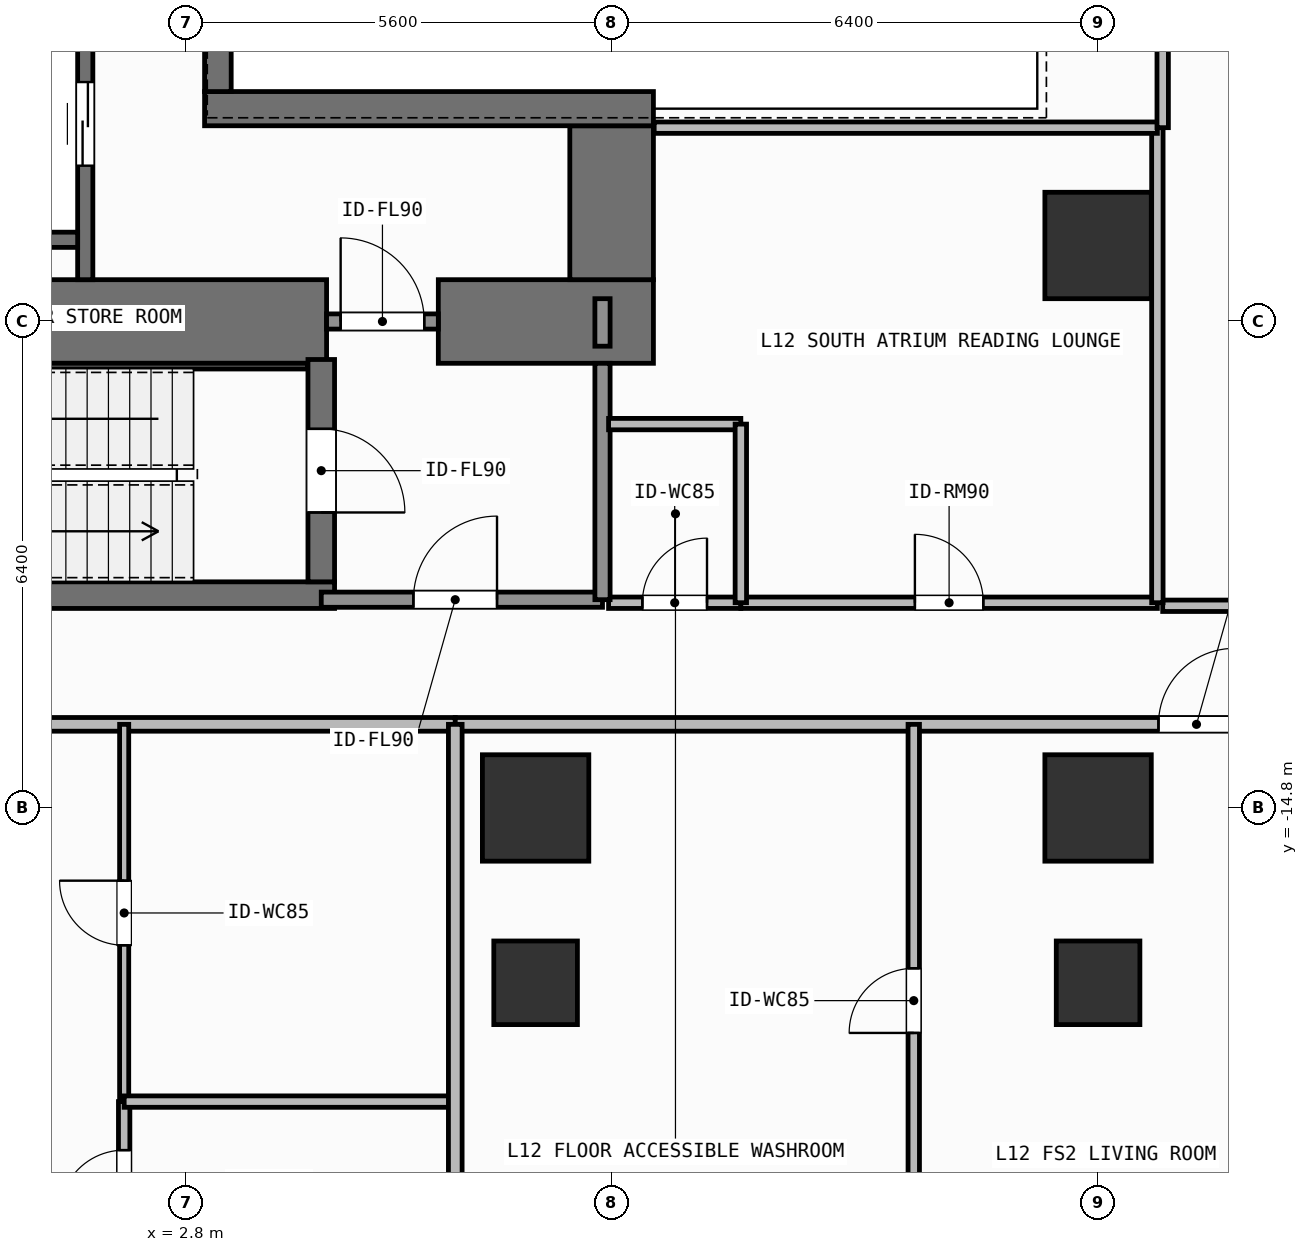
"""IFC4 building model, lengths in metres.
Left out: names, types, materials, properties, quantities, classifications, styles, units other than length and angle.
Written with IfcOpenShell. Run it as: python <this file> out.ifc"""

import sys

from ifc_helpers import new_model, si_unit, direction, frame, frame_2d, origin, origin_2d, place, context, subcontext, project, spatial, rectangle, extrude, element, fill, save


model = new_model("IFC4")
c1 = context("Model", 3, precision=1e-05, world=origin(), true_north=direction((0.0, 1.0)))
c2 = subcontext(c1, "Body", "Model", "MODEL_VIEW")
j1 = project(units=[si_unit("LENGTHUNIT", "METRE"), si_unit("PLANEANGLEUNIT", "RADIAN")], contexts=[c1])
p1 = place(None, origin())
s1 = spatial("IfcSite", under=j1, at=p1, CompositionType="ELEMENT")
p2 = place(p1, origin())
s2 = spatial("IfcBuilding", under=s1, at=p2, CompositionType="ELEMENT")
p3 = place(p2, frame((0.0, 0.0, 46.2)))
s3 = spatial("IfcBuildingStorey", under=s2, at=p3, CompositionType="ELEMENT", Elevation=46.2)
p4 = place(p3, frame((-2.62, -8.4, 0.0), z_axis=(0.0, 0.0, 1.0), x_axis=(1.0, 0.0, 0.0)))
e1 = element("IfcWall", 1, at=p4, inside=s3, PredefinedType="SHEAR", context=c2, shape_type="SweptSolid", body=[
    extrude(rectangle(XDim=7.27, YDim=1.1, at=frame_2d((3.635, 0.0))), origin(), (0.0, 0.0, 1.0), 3.9),
])
p5 = place(p3, frame((6.12, -8.4, 0.0), z_axis=(0.0, 0.0, 1.0), x_axis=(1.0, 0.0, 0.0)))
e2 = element("IfcWall", 2, at=p5, inside=s3, PredefinedType="SHEAR", context=c2, shape_type="SweptSolid", body=[
    extrude(rectangle(XDim=2.83, YDim=1.1, at=frame_2d((1.415, 0.0))), origin(), (0.0, 0.0, 1.0), 3.9),
])
p6 = place(p3, frame((8.4, -7.85, 0.0), z_axis=(0.0, 0.0, 1.0), x_axis=(0.0, 1.0, 0.0)))
e3 = element("IfcWall", 3, at=p6, inside=s3, PredefinedType="SHEAR", context=c2, shape_type="SweptSolid", body=[
    extrude(rectangle(XDim=2.025, YDim=1.1, at=frame_2d((1.013, 0.0))), origin(), (0.0, 0.0, 1.0), 3.9),
])
p7 = place(p3, frame((3.045, -5.6, 0.0), z_axis=(0.0, 0.0, 1.0), x_axis=(1.0, 0.0, 0.0)))
e4 = element("IfcWall", 4, at=p7, inside=s3, PredefinedType="SHEAR", context=c2, shape_type="SweptSolid", body=[
    extrude(rectangle(XDim=5.905, YDim=0.45, at=frame_2d((2.953, 0.0))), origin(), (0.0, 0.0, 1.0), 3.9),
])
p8 = place(p3, frame((3.22, -5.375, 0.0), z_axis=(0.0, 0.0, 1.0), x_axis=(0.0, 1.0, 0.0)))
e5 = element("IfcWall", 5, at=p8, inside=s3, PredefinedType="SHEAR", context=c2, shape_type="SweptSolid", body=[
    extrude(rectangle(XDim=10.75, YDim=0.35, at=frame_2d((5.375, 0.0))), origin(), (0.0, 0.0, 1.0), 3.9),
])
p9 = place(p3, frame((-2.555, -12.0, 0.0), z_axis=(0.0, 0.0, 1.0), x_axis=(1.0, 0.0, 0.0)))
e6 = element("IfcWall", 6, at=p9, inside=s3, PredefinedType="SHEAR", context=c2, shape_type="SweptSolid", body=[
    extrude(rectangle(XDim=7.31, YDim=0.35, at=frame_2d((3.655, 0.0))), origin(), (0.0, 0.0, 1.0), 3.9),
])
p10 = place(p3, frame((-2.2, -8.988, 0.0), z_axis=(0.0, 0.0, 1.0), x_axis=(1.0, 0.0, 0.0)))
e7 = element("IfcWall", 7, at=p10, inside=s3, PredefinedType="SHEAR", context=c2, shape_type="SweptSolid", body=[
    extrude(rectangle(XDim=6.6, YDim=0.075, at=frame_2d((3.3, 0.0))), origin(), (0.0, 0.0, 1.0), 3.9),
])
p11 = place(p3, frame((4.58, -8.9, 0.0), z_axis=(0.0, 0.0, 1.0), x_axis=(0.0, -1.0, 0.0)))
e8 = element("IfcWall", 8, at=p11, inside=s3, PredefinedType="SHEAR", context=c2, shape_type="SweptSolid", body=[
    extrude(rectangle(XDim=2.925, YDim=0.35, at=frame_2d((1.462, 0.0))), origin(), (0.0, 0.0, 1.0), 3.9),
])
p12 = place(p11, frame((0.913, 0.0, 0.0)))
e9 = element("IfcOpeningElement", 9, at=p12, cuts=e8, PredefinedType="OPENING", context=c2, shape_type="SweptSolid", body=[
    extrude(rectangle(XDim=1.1, YDim=2.15, at=frame_2d((0.55, 1.075))), frame((0.0, 0.185, 0.0), z_axis=(0.0, -1.0, 0.0), x_axis=(1.0, 0.0, 0.0)), (0.0, 0.0, 1.0), 0.37),
])
for number, where, z_axis, x_axis in (
    (10, (7.4, -14.8, 0.0), (0.0, 0.0, 1.0), (1.0, 0.0, 0.0)),
    (11, (14.8, -14.8, 0.0), (0.0, 0.0, 1.0), (1.0, 0.0, 0.0)),
    (12, (14.8, -7.4, 0.0), (0.0, 0.0, 1.0), (1.0, 0.0, 0.0)),
):
    element("IfcColumn", number, at=place(p3, frame(where, z_axis=z_axis, x_axis=x_axis)), inside=s3, PredefinedType="COLUMN", context=c2, shape_type="SweptSolid", body=[
        extrude(rectangle(XDim=1.4, YDim=1.4, at=origin_2d()), origin(), (0.0, 0.0, 1.0), 3.9),
    ])
for number, where, z_axis, x_axis in (
    (13, (7.4, -17.1, 0.0), (0.0, 0.0, 1.0), (1.0, 0.0, 0.0)),
    (14, (14.8, -17.1, 0.0), (0.0, 0.0, 1.0), (1.0, 0.0, 0.0)),
):
    element("IfcColumn", number, at=place(p3, frame(where, z_axis=z_axis, x_axis=x_axis)), inside=s3, PredefinedType="COLUMN", context=c2, shape_type="SweptSolid", body=[
        extrude(rectangle(XDim=1.1, YDim=1.1, at=origin_2d()), origin(), (0.0, 0.0, 1.0), 3.9),
    ])
p13 = place(p3, frame((1.475, -7.85, 0.0), z_axis=(0.0, 0.0, 1.0), x_axis=(0.0, 1.0, 0.0)))
e15 = element("IfcWall", 15, at=p13, inside=s3, PredefinedType="SHEAR", context=c2, shape_type="SweptSolid", body=[
    extrude(rectangle(XDim=3.575, YDim=0.2, at=frame_2d((1.788, 0.0))), origin(), (0.0, 0.0, 1.0), 3.68),
])
p14 = place(p13, frame((1.5, 0.0, 0.0)))
e16 = element("IfcOpeningElement", 16, at=p14, cuts=e15, PredefinedType="OPENING", context=c2, shape_type="SweptSolid", body=[
    extrude(rectangle(XDim=1.1, YDim=2.2, at=frame_2d((0.55, 1.1))), frame((0.0, 0.11, 0.0), z_axis=(0.0, -1.0, 0.0), x_axis=(1.0, 0.0, 0.0)), (0.0, 0.0, 1.0), 0.22),
])
p15 = place(p3, frame((-0.975, -7.325, 0.0), z_axis=(0.0, 0.0, 1.0), x_axis=(1.0, 0.0, 0.0)))
e17 = element("IfcWall", 17, at=p15, inside=s3, PredefinedType="SHEAR", context=c2, shape_type="SweptSolid", body=[
    extrude(rectangle(XDim=2.35, YDim=0.2, at=frame_2d((1.175, 0.0))), origin(), (0.0, 0.0, 1.0), 3.68),
])
p16 = place(p3, frame((4.58, -12.06, 0.0), z_axis=(0.0, 0.0, 1.0), x_axis=(1.0, 0.0, 0.0)))
e18 = element("IfcWall", 18, at=p16, inside=s3, PredefinedType="SOLIDWALL", context=c2, shape_type="SweptSolid", body=[
    extrude(rectangle(XDim=3.7, YDim=0.2, at=frame_2d((1.85, 0.0))), origin(), (0.0, 0.0, 1.0), 3.68),
])
p17 = place(p16, frame((1.212, 0.0, 0.0)))
e19 = element("IfcOpeningElement", 19, at=p17, cuts=e18, PredefinedType="OPENING", context=c2, shape_type="SweptSolid", body=[
    extrude(rectangle(XDim=1.1, YDim=2.15, at=frame_2d((0.55, 1.075))), frame((0.0, 0.11, 0.0), z_axis=(0.0, -1.0, 0.0), x_axis=(1.0, 0.0, 0.0)), (0.0, 0.0, 1.0), 0.22),
])
p18 = place(p3, frame((4.65, -8.4, 0.0), z_axis=(0.0, 0.0, 1.0), x_axis=(1.0, 0.0, 0.0)))
e20 = element("IfcWall", 20, at=p18, inside=s3, PredefinedType="SOLIDWALL", context=c2, shape_type="SweptSolid", body=[
    extrude(rectangle(XDim=1.47, YDim=0.2, at=frame_2d((0.735, 0.0))), origin(), (0.0, 0.0, 1.0), 2.72),
])
p19 = place(p18, frame((0.185, 0.0, 0.0)))
e21 = element("IfcOpeningElement", 21, at=p19, cuts=e20, PredefinedType="OPENING", context=c2, shape_type="SweptSolid", body=[
    extrude(rectangle(XDim=1.1, YDim=2.15, at=frame_2d((0.55, 1.075))), frame((0.0, 0.11, 0.0), z_axis=(0.0, -1.0, 0.0), x_axis=(1.0, 0.0, 0.0)), (0.0, 0.0, 1.0), 0.22),
])
p20 = place(p3, frame((8.36, -12.1, 0.0), z_axis=(0.0, 0.0, 1.0), x_axis=(1.0, 0.0, 0.0)))
e22 = element("IfcWall", 22, at=p20, inside=s3, PredefinedType="PARTITIONING", context=c2, shape_type="SweptSolid", body=[
    extrude(rectangle(XDim=1.74, YDim=0.15, at=frame_2d((0.87, 0.0))), origin(), (0.0, 0.0, 1.0), 3.68),
])
p21 = place(p20, frame((0.445, 0.0, 0.0)))
e23 = element("IfcOpeningElement", 23, at=p21, cuts=e22, PredefinedType="OPENING", context=c2, shape_type="SweptSolid", body=[
    extrude(rectangle(XDim=0.85, YDim=2.1, at=frame_2d((0.425, 1.05))), frame((0.0, 0.085, 0.0), z_axis=(0.0, -1.0, 0.0), x_axis=(1.0, 0.0, 0.0)), (0.0, 0.0, 1.0), 0.17),
])
p22 = place(p3, frame((10.1, -12.1, 0.0), z_axis=(0.0, 0.0, 1.0), x_axis=(1.0, 0.0, 0.0)))
e24 = element("IfcWall", 24, at=p22, inside=s3, PredefinedType="PARTITIONING", context=c2, shape_type="SweptSolid", body=[
    extrude(rectangle(XDim=5.48, YDim=0.15, at=frame_2d((2.74, 0.0))), origin(), (0.0, 0.0, 1.0), 3.68),
])
p23 = place(p22, frame((2.29, 0.0, 0.0)))
e25 = element("IfcOpeningElement", 25, at=p23, cuts=e24, PredefinedType="OPENING", context=c2, shape_type="SweptSolid", body=[
    extrude(rectangle(XDim=0.9, YDim=2.1, at=frame_2d((0.45, 1.05))), frame((0.0, 0.085, 0.0), z_axis=(0.0, -1.0, 0.0), x_axis=(1.0, 0.0, 0.0)), (0.0, 0.0, 1.0), 0.17),
])
p24 = place(p3, frame((-18.62, -13.7, 0.0), z_axis=(0.0, 0.0, 1.0), x_axis=(1.0, 0.0, 0.0)))
e26 = element("IfcWall", 26, at=p24, inside=s3, PredefinedType="PARTITIONING", context=c2, shape_type="SweptSolid", body=[
    extrude(rectangle(XDim=24.963, YDim=0.18, at=frame_2d((12.481, 0.0))), origin(), (0.0, 0.0, 1.0), 3.68),
])
p25 = place(p24, frame((11.981, 0.0, 0.0)))
e27 = element("IfcOpeningElement", 27, at=p25, cuts=e26, PredefinedType="OPENING", context=c2, shape_type="SweptSolid", body=[
    extrude(rectangle(XDim=1.0, YDim=2.2, at=frame_2d((0.5, 1.1))), frame((0.0, 0.1, 0.0), z_axis=(0.0, -1.0, 0.0), x_axis=(1.0, 0.0, 0.0)), (0.0, 0.0, 1.0), 0.2),
])
p26 = place(p3, frame((1.987, -20.79, 0.0), z_axis=(0.0, 0.0, 1.0), x_axis=(0.0, 1.0, 0.0)))
e28 = element("IfcWall", 28, at=p26, inside=s3, PredefinedType="PARTITIONING", context=c2, shape_type="SweptSolid", body=[
    extrude(rectangle(XDim=2.127, YDim=0.15, at=frame_2d((1.063, 0.0))), origin(), (0.0, 0.0, 1.0), 3.68),
])
p27 = place(p26, frame((0.638, 0.0, 0.0)))
e29 = element("IfcOpeningElement", 29, at=p27, cuts=e28, PredefinedType="OPENING", context=c2, shape_type="SweptSolid", body=[
    extrude(rectangle(XDim=0.85, YDim=2.1, at=frame_2d((0.425, 1.05))), frame((0.0, 0.085, 0.0), z_axis=(0.0, -1.0, 0.0), x_axis=(1.0, 0.0, 0.0)), (0.0, 0.0, 1.0), 0.17),
])
p28 = place(p3, frame((1.987, -18.663, 0.0), z_axis=(0.0, 0.0, 1.0), x_axis=(0.0, 1.0, 0.0)))
e30 = element("IfcWall", 30, at=p28, inside=s3, PredefinedType="PARTITIONING", context=c2, shape_type="SweptSolid", body=[
    extrude(rectangle(XDim=4.963, YDim=0.12, at=frame_2d((2.481, 0.0))), origin(), (0.0, 0.0, 1.0), 3.68),
])
p29 = place(p28, frame((2.056, 0.0, 0.0)))
e31 = element("IfcOpeningElement", 31, at=p29, cuts=e30, PredefinedType="OPENING", context=c2, shape_type="SweptSolid", body=[
    extrude(rectangle(XDim=0.85, YDim=2.1, at=frame_2d((0.425, 1.05))), frame((0.0, 0.07, 0.0), z_axis=(0.0, -1.0, 0.0), x_axis=(1.0, 0.0, 0.0)), (0.0, 0.0, 1.0), 0.14),
])
p30 = place(p3, frame((6.343, -13.7, 0.0), z_axis=(0.0, 0.0, 1.0), x_axis=(1.0, 0.0, 0.0)))
e32 = element("IfcWall", 32, at=p30, inside=s3, PredefinedType="PARTITIONING", context=c2, shape_type="SweptSolid", body=[
    extrude(rectangle(XDim=18.077, YDim=0.18, at=frame_2d((9.039, 0.0))), origin(), (0.0, 0.0, 1.0), 3.68),
])
p31 = place(p30, frame((9.252, 0.0, 0.0)))
e33 = element("IfcOpeningElement", 33, at=p31, cuts=e32, PredefinedType="OPENING", context=c2, shape_type="SweptSolid", body=[
    extrude(rectangle(XDim=1.0, YDim=2.2, at=frame_2d((0.5, 1.1))), frame((0.0, 0.1, 0.0), z_axis=(0.0, -1.0, 0.0), x_axis=(1.0, 0.0, 0.0)), (0.0, 0.0, 1.0), 0.2),
])
p32 = place(p3, frame((12.375, -20.79, 0.0), z_axis=(0.0, 0.0, 1.0), x_axis=(0.0, 1.0, 0.0)))
e34 = element("IfcWall", 34, at=p32, inside=s3, PredefinedType="PARTITIONING", context=c2, shape_type="SweptSolid", body=[
    extrude(rectangle(XDim=7.09, YDim=0.15, at=frame_2d((3.545, 0.0))), origin(), (0.0, 0.0, 1.0), 3.68),
])
p33 = place(p32, frame((3.03, 0.0, 0.0)))
e35 = element("IfcOpeningElement", 35, at=p33, cuts=e34, PredefinedType="OPENING", context=c2, shape_type="SweptSolid", body=[
    extrude(rectangle(XDim=0.85, YDim=2.1, at=frame_2d((0.425, 1.05))), frame((0.0, 0.085, 0.0), z_axis=(0.0, -1.0, 0.0), x_axis=(1.0, 0.0, 0.0)), (0.0, 0.0, 1.0), 0.17),
])
p34 = place(p3, frame((15.65, -12.14, 0.0), z_axis=(0.0, 0.0, 1.0), x_axis=(1.0, 0.0, 0.0)))
e36 = element("IfcWall", 36, at=p34, inside=s3, PredefinedType="PARTITIONING", context=c2, shape_type="SweptSolid", body=[
    extrude(rectangle(XDim=12.27, YDim=0.15, at=frame_2d((6.135, 0.0))), origin(), (0.0, 0.0, 1.0), 3.68),
])
p35 = place(p34, frame((5.15, 0.0, 0.0)))
e37 = element("IfcOpeningElement", 37, at=p35, cuts=e36, PredefinedType="OPENING", context=c2, shape_type="SweptSolid", body=[
    extrude(rectangle(XDim=0.9, YDim=2.1, at=frame_2d((0.45, 1.05))), frame((0.0, 0.085, 0.0), z_axis=(0.0, -1.0, 0.0), x_axis=(1.0, 0.0, 0.0)), (0.0, 0.0, 1.0), 0.17),
])
p36 = place(p3, frame((8.28, -12.06, 0.0), z_axis=(0.0, 0.0, 1.0), x_axis=(0.0, 1.0, 0.0)))
e38 = element("IfcWall", 38, at=p36, inside=s3, PredefinedType="SOLIDWALL", context=c2, shape_type="SweptSolid", body=[
    extrude(rectangle(XDim=3.11, YDim=0.2, at=frame_2d((1.555, 0.0))), origin(), (0.0, 0.0, 1.0), 3.68),
])
p37 = place(p3, frame((8.28, -8.725, 0.0), z_axis=(0.0, 0.0, 1.0), x_axis=(0.0, 1.0, 0.0)))
e39 = element("IfcWall", 39, at=p37, inside=s3, PredefinedType="SOLIDWALL", context=c2, shape_type="SweptSolid", body=[
    extrude(rectangle(XDim=0.625, YDim=0.2, at=frame_2d((0.312, 0.0))), origin(), (0.0, 0.0, 1.0), 3.68),
])
p38 = place(p3, frame((8.36, -9.75, 0.0), z_axis=(0.0, 0.0, 1.0), x_axis=(1.0, 0.0, 0.0)))
e40 = element("IfcWall", 40, at=p38, inside=s3, PredefinedType="PARTITIONING", context=c2, shape_type="SweptSolid", body=[
    extrude(rectangle(XDim=1.74, YDim=0.15, at=frame_2d((0.87, 0.0))), origin(), (0.0, 0.0, 1.0), 3.68),
])
p39 = place(p3, frame((10.1, -12.1, 0.0), z_axis=(0.0, 0.0, 1.0), x_axis=(0.0, 1.0, 0.0)))
e41 = element("IfcWall", 41, at=p39, inside=s3, PredefinedType="PARTITIONING", context=c2, shape_type="SweptSolid", body=[
    extrude(rectangle(XDim=2.35, YDim=0.15, at=frame_2d((1.175, 0.0))), origin(), (0.0, 0.0, 1.0), 3.68),
])
p40 = place(p3, frame((15.58, -12.1, 0.0), z_axis=(0.0, 0.0, 1.0), x_axis=(0.0, 1.0, 0.0)))
e42 = element("IfcWall", 42, at=p40, inside=s3, PredefinedType="PARTITIONING", context=c2, shape_type="SweptSolid", body=[
    extrude(rectangle(XDim=6.25, YDim=0.15, at=frame_2d((3.125, 0.0))), origin(), (0.0, 0.0, 1.0), 3.68),
])
p41 = place(p3, frame((8.96, -5.85, 0.0), z_axis=(0.0, 0.0, 1.0), x_axis=(1.0, 0.0, 0.0)))
e43 = element("IfcWall", 43, at=p41, inside=s3, PredefinedType="PARTITIONING", context=c2, shape_type="SweptSolid", body=[
    extrude(rectangle(XDim=6.62, YDim=0.15, at=frame_2d((3.31, 0.0))), origin(), (0.0, 0.0, 1.0), 3.68),
])
p42 = place(p3, frame((1.987, -18.663, 0.0), z_axis=(0.0, 0.0, 1.0), x_axis=(1.0, 0.0, 0.0)))
e44 = element("IfcWall", 44, at=p42, inside=s3, PredefinedType="PARTITIONING", context=c2, shape_type="SweptSolid", body=[
    extrude(rectangle(XDim=4.356, YDim=0.15, at=frame_2d((2.178, 0.0))), origin(), (0.0, 0.0, 1.0), 3.68),
])
p43 = place(p3, frame((6.343, -25.03, 0.0), z_axis=(0.0, 0.0, 1.0), x_axis=(0.0, 1.0, 0.0)))
e45 = element("IfcWall", 45, at=p43, inside=s3, PredefinedType="PARTITIONING", context=c2, shape_type="SweptSolid", body=[
    extrude(rectangle(XDim=11.33, YDim=0.18, at=frame_2d((5.665, 0.0))), origin(), (0.0, 0.0, 1.0), 3.68),
])
p44 = place(p3, frame((15.65, -5.85, 0.0), z_axis=(0.0, 0.0, 1.0), x_axis=(0.0, 1.0, 0.0)))
e46 = element("IfcWall", 46, at=p44, inside=s3, PredefinedType="PARTITIONING", context=c2, shape_type="SweptSolid", body=[
    extrude(rectangle(XDim=3.1, YDim=0.15, at=frame_2d((1.55, 0.0))), origin(), (0.0, 0.0, 1.0), 3.68),
])
p45 = place(p14, origin())
e47 = element("IfcDoor", 47, at=p45, inside=s3, OperationType="SLIDING_TO_LEFT", PredefinedType="DOOR", context=c2, shape_type="SweptSolid", body=[
    extrude(rectangle(XDim=1.1, YDim=2.2, at=frame_2d((0.55, 1.1))), frame((0.0, 0.025, 0.0), z_axis=(0.0, -1.0, 0.0), x_axis=(1.0, 0.0, 0.0)), (0.0, 0.0, 1.0), 0.05),
])
fill(e16, e47)
p46 = place(p12, origin())
e48 = element("IfcDoor", 48, at=p46, inside=s3, OperationType="SINGLE_SWING_RIGHT", PredefinedType="DOOR", context=c2, shape_type="SweptSolid", body=[
    extrude(rectangle(XDim=1.1, YDim=2.15, at=frame_2d((0.55, 1.075))), frame((0.0, 0.025, 0.0), z_axis=(0.0, -1.0, 0.0), x_axis=(1.0, 0.0, 0.0)), (0.0, 0.0, 1.0), 0.05),
])
fill(e9, e48)
p47 = place(p17, origin())
e49 = element("IfcDoor", 49, at=p47, inside=s3, OperationType="SINGLE_SWING_RIGHT", PredefinedType="DOOR", context=c2, shape_type="SweptSolid", body=[
    extrude(rectangle(XDim=1.1, YDim=2.15, at=frame_2d((0.55, 1.075))), frame((0.0, 0.025, 0.0), z_axis=(0.0, -1.0, 0.0), x_axis=(1.0, 0.0, 0.0)), (0.0, 0.0, 1.0), 0.05),
])
fill(e19, e49)
p48 = place(p19, origin())
e50 = element("IfcDoor", 50, at=p48, inside=s3, OperationType="SINGLE_SWING_LEFT", PredefinedType="DOOR", context=c2, shape_type="SweptSolid", body=[
    extrude(rectangle(XDim=1.1, YDim=2.15, at=frame_2d((0.55, 1.075))), frame((0.0, 0.025, 0.0), z_axis=(0.0, -1.0, 0.0), x_axis=(1.0, 0.0, 0.0)), (0.0, 0.0, 1.0), 0.05),
])
fill(e21, e50)
p49 = place(p21, origin())
e51 = element("IfcDoor", 51, at=p49, inside=s3, OperationType="SINGLE_SWING_RIGHT", PredefinedType="DOOR", context=c2, shape_type="SweptSolid", body=[
    extrude(rectangle(XDim=0.85, YDim=2.1, at=frame_2d((0.425, 1.05))), frame((0.0, 0.025, 0.0), z_axis=(0.0, -1.0, 0.0), x_axis=(1.0, 0.0, 0.0)), (0.0, 0.0, 1.0), 0.05),
])
fill(e23, e51)
p50 = place(p23, origin())
e52 = element("IfcDoor", 52, at=p50, inside=s3, OperationType="SINGLE_SWING_LEFT", PredefinedType="DOOR", context=c2, shape_type="SweptSolid", body=[
    extrude(rectangle(XDim=0.9, YDim=2.1, at=frame_2d((0.45, 1.05))), frame((0.0, 0.025, 0.0), z_axis=(0.0, -1.0, 0.0), x_axis=(1.0, 0.0, 0.0)), (0.0, 0.0, 1.0), 0.05),
])
fill(e25, e52)
p51 = place(p27, origin())
e53 = element("IfcDoor", 53, at=p51, inside=s3, OperationType="SINGLE_SWING_LEFT", PredefinedType="DOOR", context=c2, shape_type="SweptSolid", body=[
    extrude(rectangle(XDim=0.85, YDim=2.1, at=frame_2d((0.425, 1.05))), frame((0.0, 0.025, 0.0), z_axis=(0.0, -1.0, 0.0), x_axis=(1.0, 0.0, 0.0)), (0.0, 0.0, 1.0), 0.05),
])
fill(e29, e53)
p52 = place(p29, origin())
e54 = element("IfcDoor", 54, at=p52, inside=s3, OperationType="SINGLE_SWING_RIGHT", PredefinedType="DOOR", context=c2, shape_type="SweptSolid", body=[
    extrude(rectangle(XDim=0.85, YDim=2.1, at=frame_2d((0.425, 1.05))), frame((0.0, 0.025, 0.0), z_axis=(0.0, -1.0, 0.0), x_axis=(1.0, 0.0, 0.0)), (0.0, 0.0, 1.0), 0.05),
])
fill(e31, e54)
p53 = place(p31, origin())
e55 = element("IfcDoor", 55, at=p53, inside=s3, OperationType="SINGLE_SWING_RIGHT", PredefinedType="DOOR", context=c2, shape_type="SweptSolid", body=[
    extrude(rectangle(XDim=1.0, YDim=2.2, at=frame_2d((0.5, 1.1))), frame((0.0, 0.025, 0.0), z_axis=(0.0, -1.0, 0.0), x_axis=(1.0, 0.0, 0.0)), (0.0, 0.0, 1.0), 0.05),
])
fill(e33, e55)
p54 = place(p33, origin())
e56 = element("IfcDoor", 56, at=p54, inside=s3, OperationType="SINGLE_SWING_LEFT", PredefinedType="DOOR", context=c2, shape_type="SweptSolid", body=[
    extrude(rectangle(XDim=0.85, YDim=2.1, at=frame_2d((0.425, 1.05))), frame((0.0, 0.025, 0.0), z_axis=(0.0, -1.0, 0.0), x_axis=(1.0, 0.0, 0.0)), (0.0, 0.0, 1.0), 0.05),
])
fill(e35, e56)
save(model, sys.argv[1])
